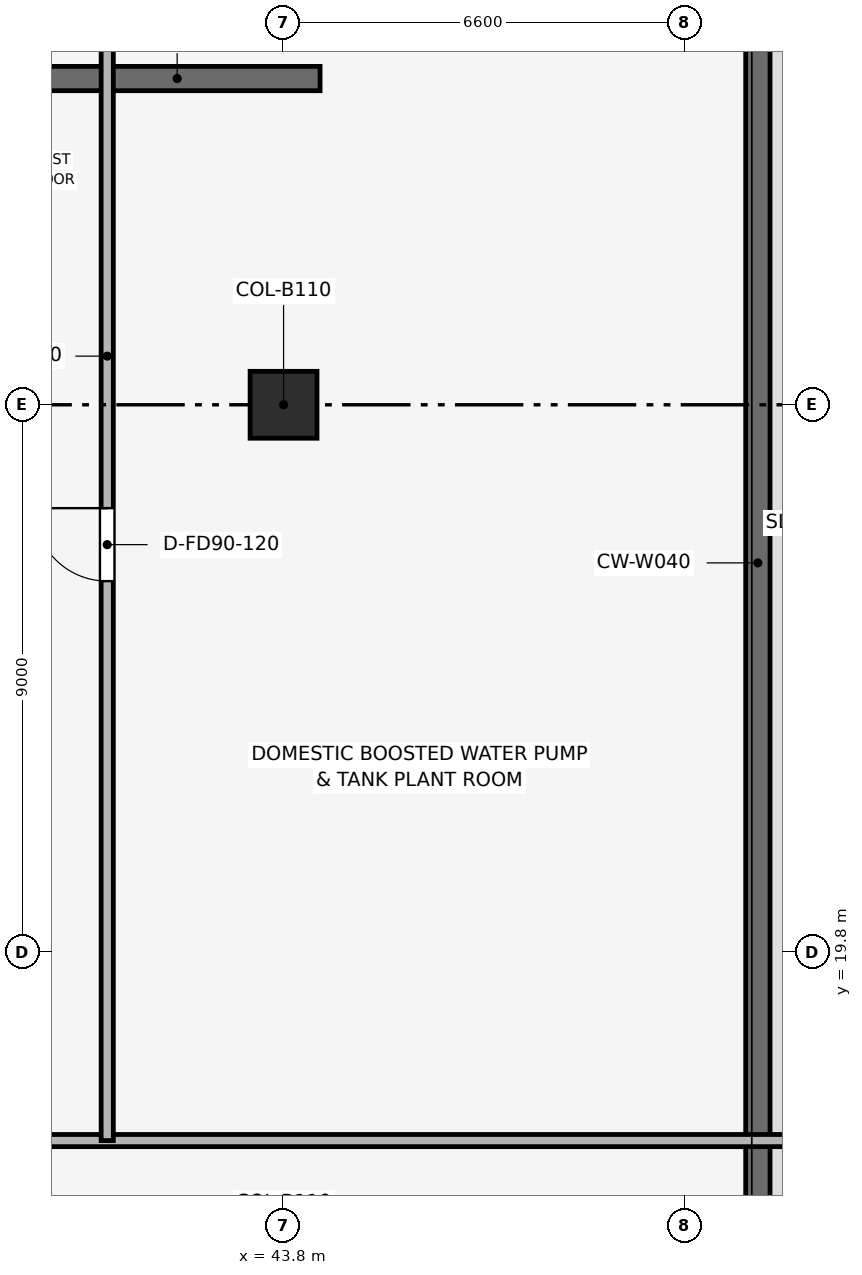
"""IFC4 building model, lengths in metres.
Left out: names, types, materials, properties, quantities, classifications, styles, units other than length and angle.
Written with IfcOpenShell. Run it as: python <this file> out.ifc"""

import sys

from ifc_helpers import new_model, si_unit, direction, frame, frame_2d, origin, origin_2d, place, context, subcontext, project, spatial, rectangle, extrude, element, fill, save


model = new_model("IFC4")
c1 = context("Model", 3, precision=1e-05, world=origin(), true_north=direction((0.0, 1.0)))
c2 = subcontext(c1, "Body", "Model", "MODEL_VIEW")
j1 = project(units=[si_unit("LENGTHUNIT", "METRE"), si_unit("PLANEANGLEUNIT", "RADIAN")], contexts=[c1])
p1 = place(None, origin())
s1 = spatial("IfcSite", under=j1, at=p1, CompositionType="ELEMENT")
p2 = place(p1, origin())
s2 = spatial("IfcBuilding", under=s1, at=p2, CompositionType="ELEMENT")
p3 = place(p2, frame((0.0, 0.0, -9.6)))
s3 = spatial("IfcBuildingStorey", under=s2, at=p3, CompositionType="ELEMENT", Elevation=-9.6)
p4 = place(p3, frame((43.8, 28.8, 0.0), z_axis=(0.0, 0.0, 1.0), x_axis=(1.0, 0.0, 0.0)))
e1 = element("IfcColumn", 1, at=p4, inside=s3, PredefinedType="COLUMN", context=c2, shape_type="SweptSolid", body=[
    extrude(rectangle(XDim=1.1, YDim=1.1, at=origin_2d()), origin(), (0.0, 0.0, 1.0), 4.798),
])
p5 = place(p3, frame((51.6, 11.6, 0.0), z_axis=(0.0, 0.0, 1.0), x_axis=(0.0, 1.0, 0.0)))
e2 = element("IfcWall", 2, at=p5, inside=s3, PredefinedType="SHEAR", context=c2, shape_type="SweptSolid", body=[
    extrude(rectangle(XDim=29.2, YDim=0.4, at=frame_2d((14.6, 0.0))), origin(), (0.0, 0.0, 1.0), 4.45),
])
p6 = place(p3, frame((39.7, 34.165, 0.0), z_axis=(0.0, 0.0, 1.0), x_axis=(1.0, 0.0, 0.0)))
e3 = element("IfcWall", 3, at=p6, inside=s3, PredefinedType="SHEAR", context=c2, shape_type="SweptSolid", body=[
    extrude(rectangle(XDim=4.7, YDim=0.4, at=frame_2d((2.35, 0.0))), origin(), (0.0, 0.0, 1.0), 4.448),
])
p7 = place(p3, frame((0.6, 16.7, 0.0), z_axis=(0.0, 0.0, 1.0), x_axis=(1.0, 0.0, 0.0)))
e4 = element("IfcWall", 4, at=p7, inside=s3, PredefinedType="PARTITIONING", context=c2, shape_type="SweptSolid", body=[
    extrude(rectangle(XDim=56.4, YDim=0.2, at=frame_2d((28.2, 0.0))), origin(), (0.0, 0.0, 1.0), 3.035),
])
p8 = place(p7, frame((20.2, 0.0, 0.0)))
e5 = element("IfcOpeningElement", 5, at=p8, cuts=e4, PredefinedType="OPENING", context=c2, shape_type="SweptSolid", body=[
    extrude(rectangle(XDim=1.2, YDim=2.2, at=frame_2d((0.6, 1.1))), frame((0.0, 0.11, 0.0), z_axis=(0.0, -1.0, 0.0), x_axis=(1.0, 0.0, 0.0)), (0.0, 0.0, 1.0), 0.22),
])
p9 = place(p7, frame((34.2, 0.0, 0.0)))
e6 = element("IfcOpeningElement", 6, at=p9, cuts=e4, PredefinedType="OPENING", context=c2, shape_type="SweptSolid", body=[
    extrude(rectangle(XDim=1.2, YDim=2.2, at=frame_2d((0.6, 1.1))), frame((0.0, 0.11, 0.0), z_axis=(0.0, -1.0, 0.0), x_axis=(1.0, 0.0, 0.0)), (0.0, 0.0, 1.0), 0.22),
])
p10 = place(p3, frame((40.9, 16.7, 0.0), z_axis=(0.0, 0.0, 1.0), x_axis=(0.0, 1.0, 0.0)))
e7 = element("IfcWall", 7, at=p10, inside=s3, PredefinedType="PARTITIONING", context=c2, shape_type="SweptSolid", body=[
    extrude(rectangle(XDim=24.2, YDim=0.2, at=frame_2d((12.1, 0.0))), origin(), (0.0, 0.0, 1.0), 3.035),
])
p11 = place(p10, frame((9.2, 0.0, 0.0)))
e8 = element("IfcOpeningElement", 8, at=p11, cuts=e7, PredefinedType="OPENING", context=c2, shape_type="SweptSolid", body=[
    extrude(rectangle(XDim=1.2, YDim=2.2, at=frame_2d((0.6, 1.1))), frame((0.0, 0.11, 0.0), z_axis=(0.0, -1.0, 0.0), x_axis=(1.0, 0.0, 0.0)), (0.0, 0.0, 1.0), 0.22),
])
p12 = place(p11, origin())
e9 = element("IfcDoor", 9, at=p12, inside=s3, OperationType="SINGLE_SWING_RIGHT", PredefinedType="DOOR", context=c2, shape_type="SweptSolid", body=[
    extrude(rectangle(XDim=1.2, YDim=2.2, at=frame_2d((0.6, 1.1))), frame((0.0, 0.025, 0.0), z_axis=(0.0, -1.0, 0.0), x_axis=(1.0, 0.0, 0.0)), (0.0, 0.0, 1.0), 0.05),
])
fill(e8, e9)
save(model, sys.argv[1])
